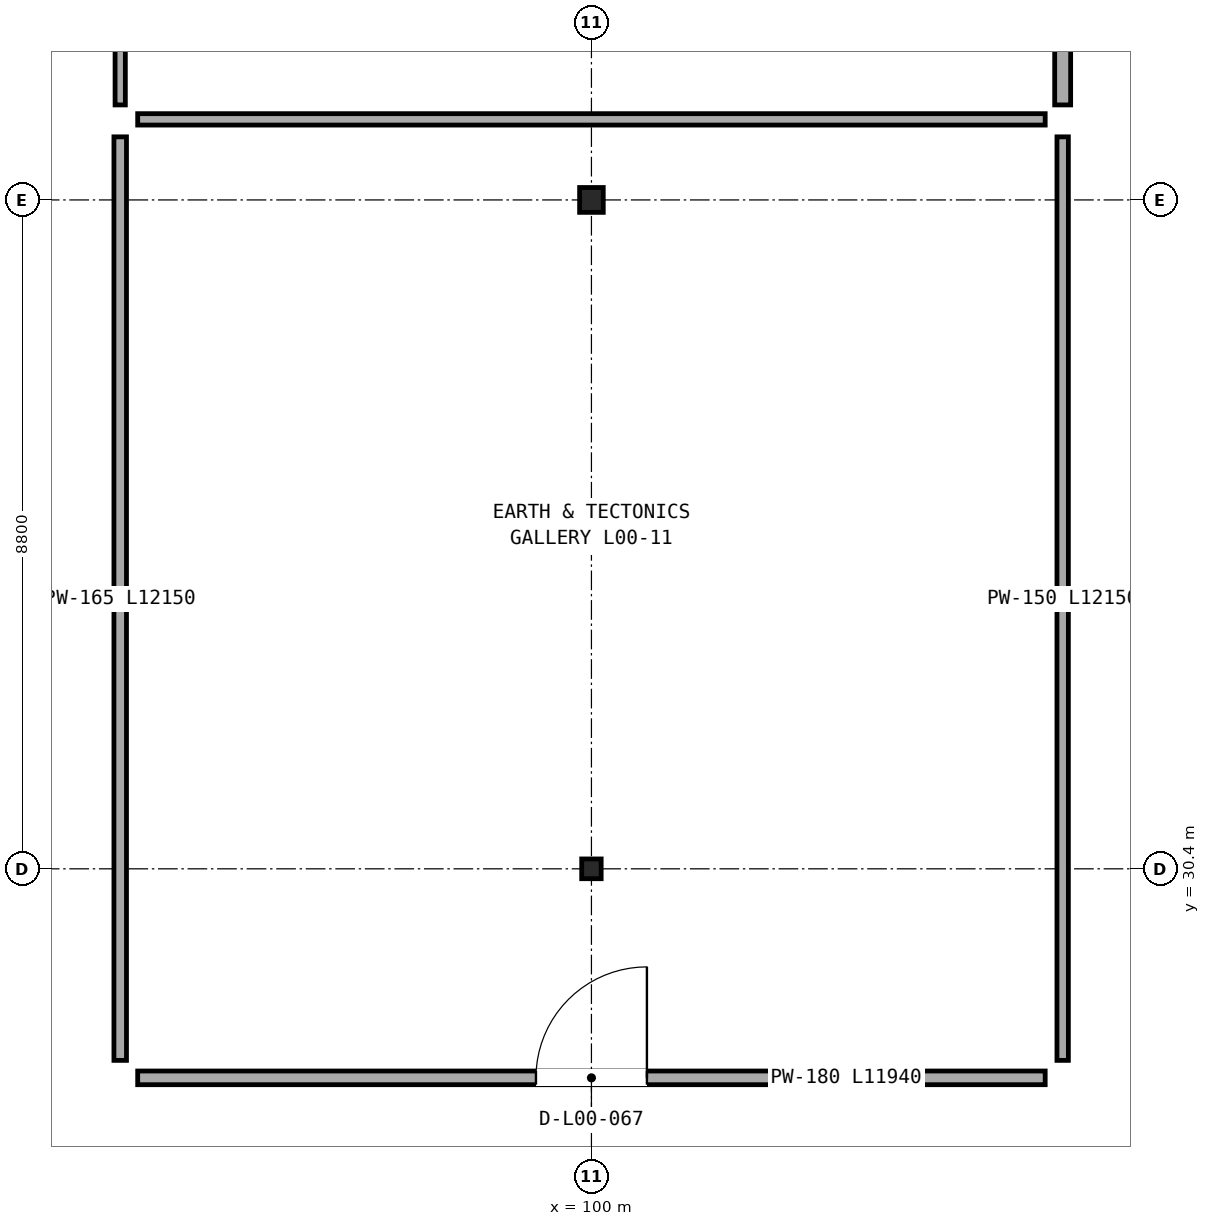
"""IFC4 building model, lengths in metres.
Left out: names, types, materials, properties, quantities, classifications, styles, units other than length and angle.
Written with IfcOpenShell. Run it as: python <this file> out.ifc"""

import sys

from ifc_helpers import new_model, si_unit, direction, frame, frame_2d, origin, origin_2d, place, context, subcontext, project, spatial, rectangle, i_section, extrude, element, fill, save


model = new_model("IFC4")
c1 = context("Model", 3, precision=1e-05, world=origin(), true_north=direction((0.0, 1.0)))
c2 = subcontext(c1, "Body", "Model", "MODEL_VIEW")
j1 = project(units=[si_unit("LENGTHUNIT", "METRE"), si_unit("PLANEANGLEUNIT", "RADIAN")], contexts=[c1])
p1 = place(None, origin())
s1 = spatial("IfcSite", under=j1, at=p1, CompositionType="ELEMENT")
p2 = place(p1, origin())
s2 = spatial("IfcBuilding", under=s1, at=p2, CompositionType="ELEMENT")
p3 = place(p2, origin())
s3 = spatial("IfcBuildingStorey", under=s2, at=p3, CompositionType="ELEMENT", Elevation=0.0)
p4 = place(p3, frame((100.0, 30.4, 0.0), z_axis=(0.0, 0.0, 1.0), x_axis=(1.0, 0.0, 0.0)))
e1 = element("IfcColumn", 1, at=p4, inside=s3, PredefinedType="COLUMN", context=c2, shape_type="SweptSolid", body=[
    extrude(i_section(OverallWidth=0.256, OverallDepth=0.26, WebThickness=0.01, FlangeThickness=0.017, FilletRadius=0.013, at=origin_2d()), origin(), (0.0, 0.0, 1.0), 5.6),
])
p5 = place(p3, frame((100.0, 39.2, 0.0), z_axis=(0.0, 0.0, 1.0), x_axis=(1.0, 0.0, 0.0)))
e2 = element("IfcColumn", 2, at=p5, inside=s3, PredefinedType="COLUMN", context=c2, shape_type="SweptSolid", body=[
    extrude(i_section(OverallWidth=0.311, OverallDepth=0.327, WebThickness=0.016, FlangeThickness=0.025, FilletRadius=0.017, at=origin_2d()), origin(), (0.0, 0.0, 1.0), 5.6),
])
p6 = place(p3, frame((105.97, 27.65, 0.0), z_axis=(0.0, 0.0, 1.0), x_axis=(-1.0, 0.0, 0.0)))
e3 = element("IfcWall", 3, at=p6, inside=s3, PredefinedType="PARTITIONING", context=c2, shape_type="SweptSolid", body=[
    extrude(rectangle(XDim=11.94, YDim=0.18, at=frame_2d((5.97, 0.0))), origin(), (0.0, 0.0, 1.0), 4.787),
])
p7 = place(p6, frame((5.24, 0.0, 0.0)))
e4 = element("IfcOpeningElement", 4, at=p7, cuts=e3, PredefinedType="OPENING", context=c2, shape_type="SweptSolid", body=[
    extrude(rectangle(XDim=1.46, YDim=2.46, at=frame_2d((0.73, 1.23))), frame((0.0, 0.1, 0.0), z_axis=(0.0, -1.0, 0.0), x_axis=(1.0, 0.0, 0.0)), (0.0, 0.0, 1.0), 0.2),
])
p8 = place(p3, frame((93.8, 27.88, 0.0), z_axis=(0.0, 0.0, 1.0), x_axis=(0.0, 1.0, 0.0)))
e5 = element("IfcWall", 5, at=p8, inside=s3, PredefinedType="PARTITIONING", context=c2, shape_type="SweptSolid", body=[
    extrude(rectangle(XDim=12.15, YDim=0.165, at=frame_2d((6.075, 0.0))), origin(), (0.0, 0.0, 1.0), 4.708),
])
p9 = place(p3, frame((106.2, 40.03, 0.0), z_axis=(0.0, 0.0, 1.0), x_axis=(0.0, -1.0, 0.0)))
e6 = element("IfcWall", 6, at=p9, inside=s3, PredefinedType="PARTITIONING", context=c2, shape_type="SweptSolid", body=[
    extrude(rectangle(XDim=12.15, YDim=0.15, at=frame_2d((6.075, 0.0))), origin(), (0.0, 0.0, 1.0), 4.708),
])
p10 = place(p3, frame((93.8, 40.45, 0.0), z_axis=(0.0, 0.0, 1.0), x_axis=(0.0, 1.0, 0.0)))
e7 = element("IfcWall", 7, at=p10, inside=s3, PredefinedType="PARTITIONING", context=c2, shape_type="SweptSolid", body=[
    extrude(rectangle(XDim=10.47, YDim=0.135, at=frame_2d((5.235, 0.0))), origin(), (0.0, 0.0, 1.0), 4.708),
])
p11 = place(p10, frame((4.425, 0.0, 0.0)))
e8 = element("IfcOpeningElement", 8, at=p11, cuts=e7, PredefinedType="OPENING", context=c2, shape_type="SweptSolid", body=[
    extrude(rectangle(XDim=1.62, YDim=2.46, at=frame_2d((0.81, 1.23))), frame((0.0, 0.078, 0.0), z_axis=(0.0, -1.0, 0.0), x_axis=(1.0, 0.0, 0.0)), (0.0, 0.0, 1.0), 0.155),
])
p12 = place(p3, frame((106.2, 50.92, 0.0), z_axis=(0.0, 0.0, 1.0), x_axis=(0.0, -1.0, 0.0)))
e9 = element("IfcWall", 9, at=p12, inside=s3, PredefinedType="PARTITIONING", context=c2, shape_type="SweptSolid", body=[
    extrude(rectangle(XDim=10.47, YDim=0.21, at=frame_2d((5.235, 0.0))), origin(), (0.0, 0.0, 1.0), 4.708),
])
p13 = place(p3, frame((94.03, 40.26, 0.0), z_axis=(0.0, 0.0, 1.0), x_axis=(1.0, 0.0, 0.0)))
e10 = element("IfcWall", 10, at=p13, inside=s3, PredefinedType="PARTITIONING", context=c2, shape_type="SweptSolid", body=[
    extrude(rectangle(XDim=11.94, YDim=0.15, at=frame_2d((5.97, 0.0))), origin(), (0.0, 0.0, 1.0), 4.787),
])
p14 = place(p7, frame((1.46, 0.0, 0.0), z_axis=(0.0, 0.0, 1.0), x_axis=(-1.0, 0.0, 0.0)))
e11 = element("IfcDoor", 11, at=p14, inside=s3, OperationType="SINGLE_SWING_LEFT", PredefinedType="DOOR", context=c2, shape_type="SweptSolid", body=[
    extrude(rectangle(XDim=1.46, YDim=2.46, at=frame_2d((0.73, 1.23))), frame((0.0, 0.025, 0.0), z_axis=(0.0, -1.0, 0.0), x_axis=(1.0, 0.0, 0.0)), (0.0, 0.0, 1.0), 0.05),
])
fill(e4, e11)
save(model, sys.argv[1])
